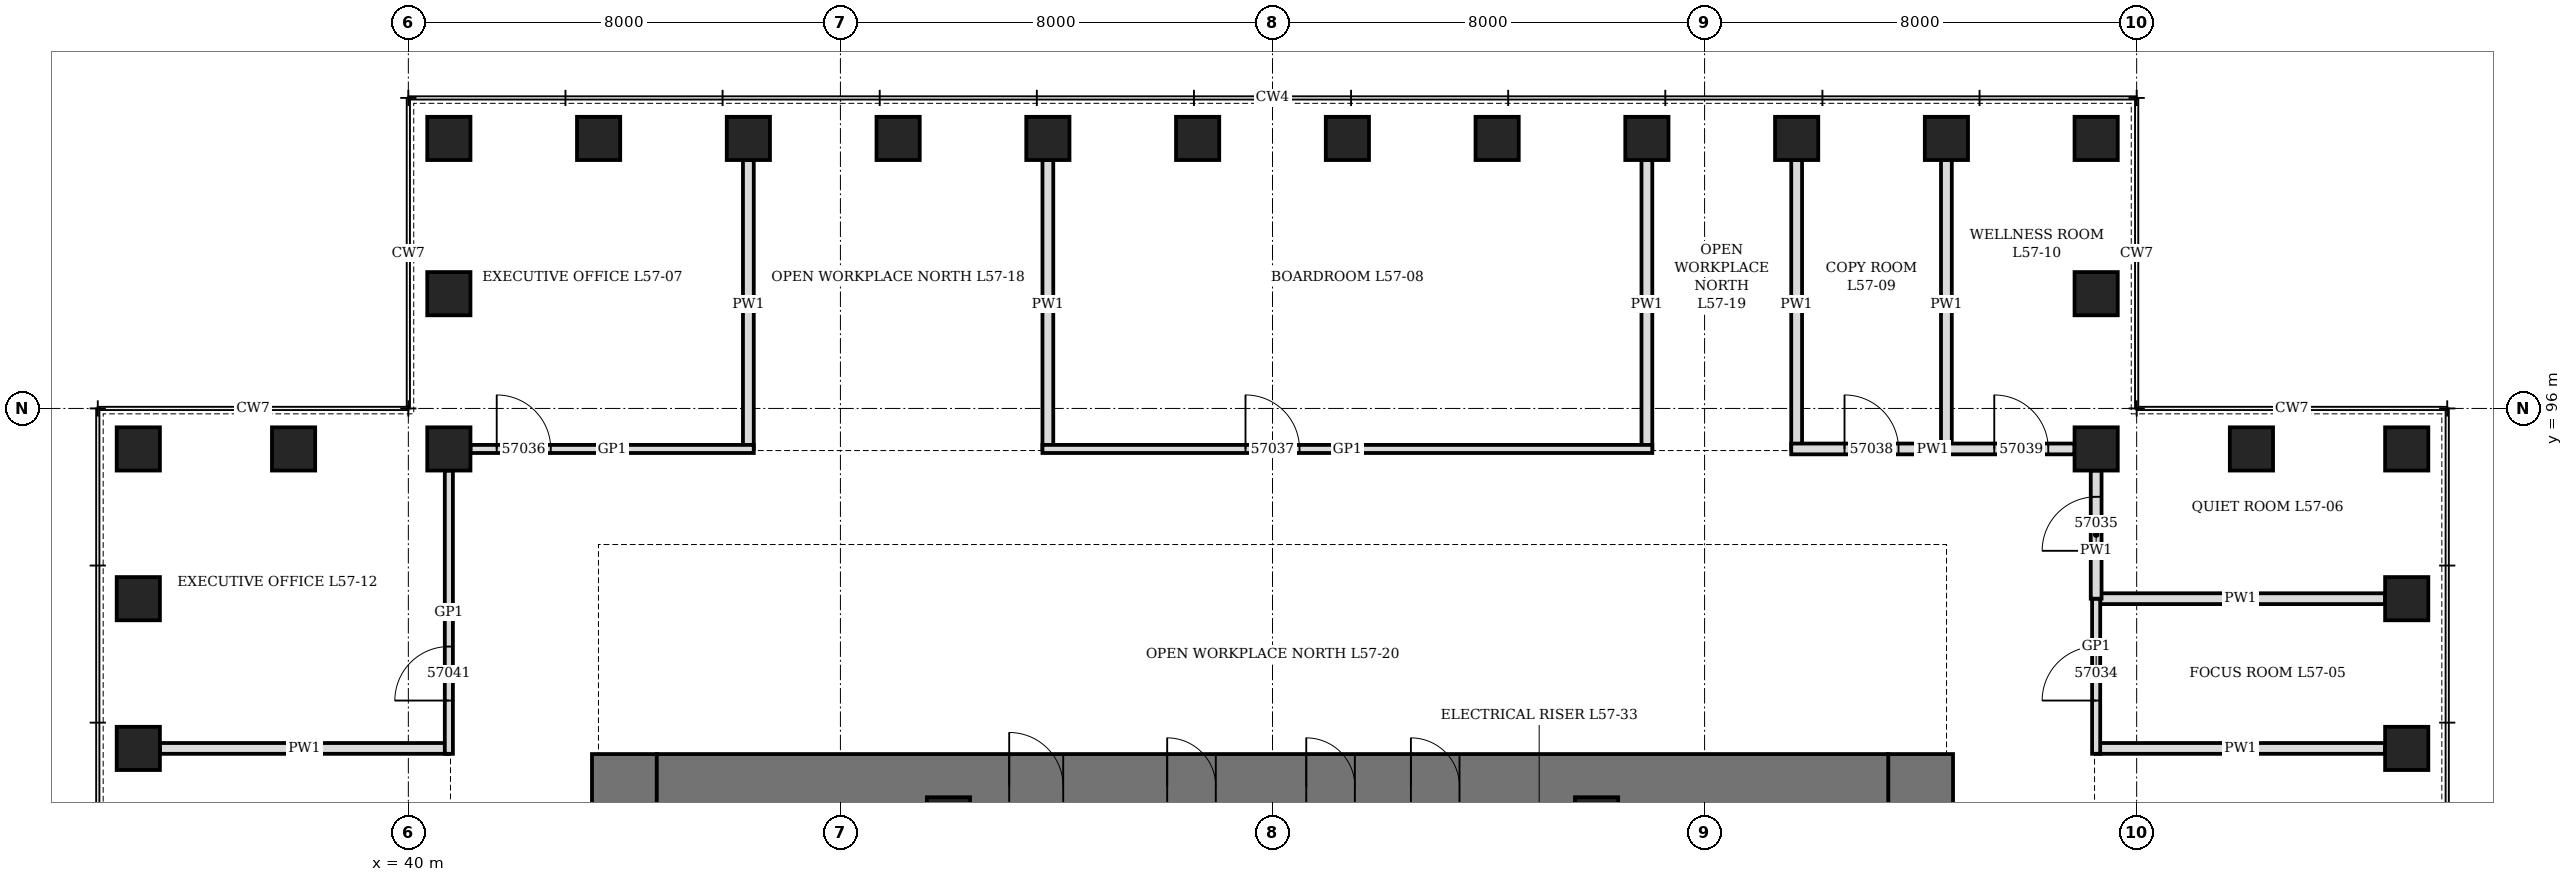
"""IFC4 building model, lengths in metres.
Left out: names, types, materials, properties, quantities, classifications, styles, units other than length and angle.
Written with IfcOpenShell. Run it as: python <this file> out.ifc"""

import sys

from ifc_helpers import new_model, si_unit, direction, frame, frame_2d, origin, origin_2d, place, context, subcontext, project, spatial, rectangle, hollow_rectangle, extrude, element, fill, save


model = new_model("IFC4")
c1 = context("Model", 3, precision=1e-05, world=origin(), true_north=direction((0.0, 1.0)))
c2 = subcontext(c1, "Body", "Model", "MODEL_VIEW")
j1 = project(units=[si_unit("LENGTHUNIT", "METRE"), si_unit("PLANEANGLEUNIT", "RADIAN")], contexts=[c1])
p1 = place(None, origin())
s1 = spatial("IfcSite", under=j1, at=p1, CompositionType="ELEMENT")
p2 = place(p1, origin())
s2 = spatial("IfcBuilding", under=s1, at=p2, CompositionType="ELEMENT")
p3 = place(p2, frame((0.0, 0.0, 254.5)))
s3 = spatial("IfcBuildingStorey", under=s2, at=p3, CompositionType="ELEMENT", Elevation=254.5)
for number, where, z_axis, x_axis in (
    (1, (77.0, 89.705, 0.0), (0.0, 0.0, 1.0), (0.0, 1.0, 0.0)),
    (2, (77.0, 92.477, 0.0), (0.0, 0.0, 1.0), (0.0, 1.0, 0.0)),
    (3, (77.0, 95.25, 0.0), (0.0, 0.0, 1.0), (1.0, 0.0, 0.0)),
    (4, (74.125, 95.25, 0.0), (0.0, 0.0, 1.0), (1.0, 0.0, 0.0)),
    (5, (71.25, 95.25, 0.0), (0.0, 0.0, 1.0), (0.0, 1.0, 0.0)),
    (6, (71.25, 98.125, 0.0), (0.0, 0.0, 1.0), (0.0, 1.0, 0.0)),
    (7, (71.25, 101.0, 0.0), (0.0, 0.0, 1.0), (1.0, 0.0, 0.0)),
    (8, (68.477, 101.0, 0.0), (0.0, 0.0, 1.0), (1.0, 0.0, 0.0)),
    (9, (65.705, 101.0, 0.0), (0.0, 0.0, 1.0), (1.0, 0.0, 0.0)),
    (10, (62.932, 101.0, 0.0), (0.0, 0.0, 1.0), (1.0, 0.0, 0.0)),
    (11, (60.159, 101.0, 0.0), (0.0, 0.0, 1.0), (1.0, 0.0, 0.0)),
    (12, (57.386, 101.0, 0.0), (0.0, 0.0, 1.0), (1.0, 0.0, 0.0)),
    (13, (54.614, 101.0, 0.0), (0.0, 0.0, 1.0), (1.0, 0.0, 0.0)),
    (14, (51.841, 101.0, 0.0), (0.0, 0.0, 1.0), (1.0, 0.0, 0.0)),
    (15, (49.068, 101.0, 0.0), (0.0, 0.0, 1.0), (1.0, 0.0, 0.0)),
    (16, (46.295, 101.0, 0.0), (0.0, 0.0, 1.0), (1.0, 0.0, 0.0)),
    (17, (43.523, 101.0, 0.0), (0.0, 0.0, 1.0), (1.0, 0.0, 0.0)),
    (18, (40.75, 101.0, 0.0), (0.0, 0.0, 1.0), (0.0, 1.0, 0.0)),
    (19, (40.75, 98.125, 0.0), (0.0, 0.0, 1.0), (0.0, 1.0, 0.0)),
    (20, (40.75, 95.25, 0.0), (0.0, 0.0, 1.0), (1.0, 0.0, 0.0)),
    (21, (37.875, 95.25, 0.0), (0.0, 0.0, 1.0), (1.0, 0.0, 0.0)),
    (22, (35.0, 95.25, 0.0), (0.0, 0.0, 1.0), (0.0, 1.0, 0.0)),
    (23, (35.0, 92.477, 0.0), (0.0, 0.0, 1.0), (0.0, 1.0, 0.0)),
    (24, (35.0, 89.705, 0.0), (0.0, 0.0, 1.0), (0.0, 1.0, 0.0)),
):
    element("IfcColumn", number, at=place(p3, frame(where, z_axis=z_axis, x_axis=x_axis)), inside=s3, PredefinedType="COLUMN", context=c2, shape_type="SweptSolid", body=[
        extrude(hollow_rectangle(XDim=0.8, YDim=0.8, WallThickness=0.1, at=origin_2d()), origin(), (0.0, 0.0, 1.0), 4.2),
    ])
p4 = place(p3, frame((44.0, 70.4, 0.0), z_axis=(0.0, 0.0, 1.0), x_axis=(0.0, 1.0, 0.0)))
e25 = element("IfcWall", 25, at=p4, inside=s3, PredefinedType="SHEAR", context=c2, shape_type="SweptSolid", body=[
    extrude(rectangle(XDim=19.2, YDim=1.2, at=frame_2d((9.6, 0.0))), origin(), (0.0, 0.0, 1.0), 4.2),
])
p5 = place(p4, frame((8.6, 0.0, 0.0)))
e26 = element("IfcOpeningElement", 26, at=p5, cuts=e25, PredefinedType="OPENING", context=c2, shape_type="SweptSolid", body=[
    extrude(rectangle(XDim=2.0, YDim=2.4, at=frame_2d((1.0, 1.2))), frame((0.0, 0.61, 0.0), z_axis=(0.0, -1.0, 0.0), x_axis=(1.0, 0.0, 0.0)), (0.0, 0.0, 1.0), 1.22),
])
p6 = place(p3, frame((68.0, 70.4, 0.0), z_axis=(0.0, 0.0, 1.0), x_axis=(0.0, 1.0, 0.0)))
e27 = element("IfcWall", 27, at=p6, inside=s3, PredefinedType="SHEAR", context=c2, shape_type="SweptSolid", body=[
    extrude(rectangle(XDim=19.2, YDim=1.2, at=frame_2d((9.6, 0.0))), origin(), (0.0, 0.0, 1.0), 4.2),
])
p7 = place(p6, frame((8.6, 0.0, 0.0)))
e28 = element("IfcOpeningElement", 28, at=p7, cuts=e27, PredefinedType="OPENING", context=c2, shape_type="SweptSolid", body=[
    extrude(rectangle(XDim=2.0, YDim=2.4, at=frame_2d((1.0, 1.2))), frame((0.0, 0.61, 0.0), z_axis=(0.0, -1.0, 0.0), x_axis=(1.0, 0.0, 0.0)), (0.0, 0.0, 1.0), 1.22),
])
p8 = place(p3, frame((44.6, 89.0, 0.0), z_axis=(0.0, 0.0, 1.0), x_axis=(1.0, 0.0, 0.0)))
e29 = element("IfcWall", 29, at=p8, inside=s3, PredefinedType="SHEAR", context=c2, shape_type="SweptSolid", body=[
    extrude(rectangle(XDim=22.8, YDim=1.2, at=frame_2d((11.4, 0.0))), origin(), (0.0, 0.0, 1.0), 4.2),
])
p9 = place(p8, frame((6.525, 0.0, 0.0)))
e30 = element("IfcOpeningElement", 30, at=p9, cuts=e29, PredefinedType="OPENING", context=c2, shape_type="SweptSolid", body=[
    extrude(rectangle(XDim=1.0, YDim=2.1, at=frame_2d((0.5, 1.05))), frame((0.0, 0.61, 0.0), z_axis=(0.0, -1.0, 0.0), x_axis=(1.0, 0.0, 0.0)), (0.0, 0.0, 1.0), 1.22),
])
p10 = place(p8, frame((9.45, 0.0, 0.0)))
e31 = element("IfcOpeningElement", 31, at=p10, cuts=e29, PredefinedType="OPENING", context=c2, shape_type="SweptSolid", body=[
    extrude(rectangle(XDim=0.9, YDim=2.1, at=frame_2d((0.45, 1.05))), frame((0.0, 0.61, 0.0), z_axis=(0.0, -1.0, 0.0), x_axis=(1.0, 0.0, 0.0)), (0.0, 0.0, 1.0), 1.22),
])
p11 = place(p8, frame((12.025, 0.0, 0.0)))
e32 = element("IfcOpeningElement", 32, at=p11, cuts=e29, PredefinedType="OPENING", context=c2, shape_type="SweptSolid", body=[
    extrude(rectangle(XDim=0.9, YDim=2.1, at=frame_2d((0.45, 1.05))), frame((0.0, 0.61, 0.0), z_axis=(0.0, -1.0, 0.0), x_axis=(1.0, 0.0, 0.0)), (0.0, 0.0, 1.0), 1.22),
])
p12 = place(p8, frame((13.962, 0.0, 0.0)))
e33 = element("IfcOpeningElement", 33, at=p12, cuts=e29, PredefinedType="OPENING", context=c2, shape_type="SweptSolid", body=[
    extrude(rectangle(XDim=0.9, YDim=2.1, at=frame_2d((0.45, 1.05))), frame((0.0, 0.61, 0.0), z_axis=(0.0, -1.0, 0.0), x_axis=(1.0, 0.0, 0.0)), (0.0, 0.0, 1.0), 1.22),
])
for number, where, z_axis, x_axis in (
    (34, (50.0, 88.4, 0.0), (0.0, 0.0, 1.0), (1.0, 0.0, 0.0)),
    (35, (62.0, 88.4, 0.0), (0.0, 0.0, 1.0), (1.0, 0.0, 0.0)),
):
    element("IfcColumn", number, at=place(p3, frame(where, z_axis=z_axis, x_axis=x_axis)), inside=s3, PredefinedType="COLUMN", context=c2, shape_type="SweptSolid", body=[
        extrude(hollow_rectangle(XDim=0.8, YDim=0.8, WallThickness=0.1, at=origin_2d()), origin(), (0.0, 0.0, 1.0), 4.2),
    ])
for number, where, z_axis, x_axis in (
    (36, (71.25, 89.705, 0.0), (0.0, 0.0, 1.0), (1.0, 0.0, 0.0)),
    (37, (71.25, 92.477, 0.0), (0.0, 0.0, 1.0), (1.0, 0.0, 0.0)),
    (38, (46.295, 95.25, 0.0), (0.0, 0.0, 1.0), (0.0, 1.0, 0.0)),
    (39, (51.841, 95.25, 0.0), (0.0, 0.0, 1.0), (0.0, 1.0, 0.0)),
    (40, (62.932, 95.25, 0.0), (0.0, 0.0, 1.0), (0.0, 1.0, 0.0)),
    (41, (65.705, 95.25, 0.0), (0.0, 0.0, 1.0), (0.0, 1.0, 0.0)),
    (42, (68.477, 95.25, 0.0), (0.0, 0.0, 1.0), (0.0, 1.0, 0.0)),
    (43, (35.4, 89.705, 0.0), (0.0, 0.0, 1.0), (1.0, 0.0, 0.0)),
):
    element("IfcWall", number, at=place(p3, frame(where, z_axis=z_axis, x_axis=x_axis)), inside=s3, PredefinedType="PARTITIONING", context=c2, shape_type="SweptSolid", body=[
        extrude(rectangle(XDim=5.35, YDim=0.2, at=frame_2d((2.675, 0.0))), origin(), (0.0, 0.0, 1.0), 3.428),
    ])
p13 = place(p3, frame((41.15, 95.25, 0.0), z_axis=(0.0, 0.0, 1.0), x_axis=(1.0, 0.0, 0.0)))
e44 = element("IfcWall", 44, at=p13, inside=s3, PredefinedType="PARTITIONING", context=c2, shape_type="SweptSolid", body=[
    extrude(rectangle(XDim=5.246, YDim=0.15, at=frame_2d((2.623, 0.0))), origin(), (0.0, 0.0, 1.0), 4.04),
])
p14 = place(p13, frame((0.486, 0.0, 0.0)))
e45 = element("IfcOpeningElement", 45, at=p14, cuts=e44, PredefinedType="OPENING", context=c2, shape_type="SweptSolid", body=[
    extrude(rectangle(XDim=1.0, YDim=2.1, at=frame_2d((0.5, 1.05))), frame((0.0, 0.085, 0.0), z_axis=(0.0, -1.0, 0.0), x_axis=(1.0, 0.0, 0.0)), (0.0, 0.0, 1.0), 0.17),
])
p15 = place(p3, frame((51.741, 95.25, 0.0), z_axis=(0.0, 0.0, 1.0), x_axis=(1.0, 0.0, 0.0)))
e46 = element("IfcWall", 46, at=p15, inside=s3, PredefinedType="PARTITIONING", context=c2, shape_type="SweptSolid", body=[
    extrude(rectangle(XDim=11.291, YDim=0.15, at=frame_2d((5.646, 0.0))), origin(), (0.0, 0.0, 1.0), 4.04),
])
p16 = place(p15, frame((3.759, 0.0, 0.0)))
e47 = element("IfcOpeningElement", 47, at=p16, cuts=e46, PredefinedType="OPENING", context=c2, shape_type="SweptSolid", body=[
    extrude(rectangle(XDim=1.0, YDim=2.4, at=frame_2d((0.5, 1.2))), frame((0.0, 0.085, 0.0), z_axis=(0.0, -1.0, 0.0), x_axis=(1.0, 0.0, 0.0)), (0.0, 0.0, 1.0), 0.17),
])
p17 = place(p3, frame((65.604, 95.25, 0.0), z_axis=(0.0, 0.0, 1.0), x_axis=(1.0, 0.0, 0.0)))
e48 = element("IfcWall", 48, at=p17, inside=s3, PredefinedType="PARTITIONING", context=c2, shape_type="SweptSolid", body=[
    extrude(rectangle(XDim=5.246, YDim=0.2, at=frame_2d((2.623, 0.0))), origin(), (0.0, 0.0, 1.0), 4.04),
])
p18 = place(p17, frame((0.986, 0.0, 0.0)))
e49 = element("IfcOpeningElement", 49, at=p18, cuts=e48, PredefinedType="OPENING", context=c2, shape_type="SweptSolid", body=[
    extrude(rectangle(XDim=1.0, YDim=2.1, at=frame_2d((0.5, 1.05))), frame((0.0, 0.11, 0.0), z_axis=(0.0, -1.0, 0.0), x_axis=(1.0, 0.0, 0.0)), (0.0, 0.0, 1.0), 0.22),
])
p19 = place(p17, frame((3.759, 0.0, 0.0)))
e50 = element("IfcOpeningElement", 50, at=p19, cuts=e48, PredefinedType="OPENING", context=c2, shape_type="SweptSolid", body=[
    extrude(rectangle(XDim=1.0, YDim=2.1, at=frame_2d((0.5, 1.05))), frame((0.0, 0.11, 0.0), z_axis=(0.0, -1.0, 0.0), x_axis=(1.0, 0.0, 0.0)), (0.0, 0.0, 1.0), 0.22),
])
p20 = place(p3, frame((40.75, 89.604, 0.0), z_axis=(0.0, 0.0, 1.0), x_axis=(0.0, 1.0, 0.0)))
e51 = element("IfcWall", 51, at=p20, inside=s3, PredefinedType="PARTITIONING", context=c2, shape_type="SweptSolid", body=[
    extrude(rectangle(XDim=5.246, YDim=0.15, at=frame_2d((2.623, 0.0))), origin(), (0.0, 0.0, 1.0), 4.04),
])
p21 = place(p20, frame((0.986, 0.0, 0.0)))
e52 = element("IfcOpeningElement", 52, at=p21, cuts=e51, PredefinedType="OPENING", context=c2, shape_type="SweptSolid", body=[
    extrude(rectangle(XDim=1.0, YDim=2.1, at=frame_2d((0.5, 1.05))), frame((0.0, 0.085, 0.0), z_axis=(0.0, -1.0, 0.0), x_axis=(1.0, 0.0, 0.0)), (0.0, 0.0, 1.0), 0.17),
])
p22 = place(p3, frame((71.25, 89.604, 0.0), z_axis=(0.0, 0.0, 1.0), x_axis=(0.0, 1.0, 0.0)))
e53 = element("IfcWall", 53, at=p22, inside=s3, PredefinedType="PARTITIONING", context=c2, shape_type="SweptSolid", body=[
    extrude(rectangle(XDim=2.873, YDim=0.15, at=frame_2d((1.437, 0.0))), origin(), (0.0, 0.0, 1.0), 4.04),
])
p23 = place(p22, frame((0.986, 0.0, 0.0)))
e54 = element("IfcOpeningElement", 54, at=p23, cuts=e53, PredefinedType="OPENING", context=c2, shape_type="SweptSolid", body=[
    extrude(rectangle(XDim=1.0, YDim=2.4, at=frame_2d((0.5, 1.2))), frame((0.0, 0.085, 0.0), z_axis=(0.0, -1.0, 0.0), x_axis=(1.0, 0.0, 0.0)), (0.0, 0.0, 1.0), 0.17),
])
p24 = place(p3, frame((71.25, 92.477, 0.0), z_axis=(0.0, 0.0, 1.0), x_axis=(0.0, 1.0, 0.0)))
e55 = element("IfcWall", 55, at=p24, inside=s3, PredefinedType="PARTITIONING", context=c2, shape_type="SweptSolid", body=[
    extrude(rectangle(XDim=2.373, YDim=0.2, at=frame_2d((1.187, 0.0))), origin(), (0.0, 0.0, 1.0), 4.04),
])
p25 = place(p24, frame((0.886, 0.0, 0.0)))
e56 = element("IfcOpeningElement", 56, at=p25, cuts=e55, PredefinedType="OPENING", context=c2, shape_type="SweptSolid", body=[
    extrude(rectangle(XDim=1.0, YDim=2.1, at=frame_2d((0.5, 1.05))), frame((0.0, 0.11, 0.0), z_axis=(0.0, -1.0, 0.0), x_axis=(1.0, 0.0, 0.0)), (0.0, 0.0, 1.0), 0.22),
])
p26 = place(p9, origin())
e57 = element("IfcDoor", 57, at=p26, inside=s3, OperationType="SINGLE_SWING_LEFT", PredefinedType="DOOR", context=c2, shape_type="SweptSolid", body=[
    extrude(rectangle(XDim=1.0, YDim=2.1, at=frame_2d((0.5, 1.05))), frame((0.0, 0.35, 0.0), z_axis=(0.0, -1.0, 0.0), x_axis=(1.0, 0.0, 0.0)), (0.0, 0.0, 1.0), 0.7),
])
fill(e30, e57)
p27 = place(p10, origin())
e58 = element("IfcDoor", 58, at=p27, inside=s3, OperationType="SINGLE_SWING_LEFT", PredefinedType="DOOR", context=c2, shape_type="SweptSolid", body=[
    extrude(rectangle(XDim=0.9, YDim=2.1, at=frame_2d((0.45, 1.05))), frame((0.0, 0.35, 0.0), z_axis=(0.0, -1.0, 0.0), x_axis=(1.0, 0.0, 0.0)), (0.0, 0.0, 1.0), 0.7),
])
fill(e31, e58)
p28 = place(p11, origin())
e59 = element("IfcDoor", 59, at=p28, inside=s3, OperationType="SINGLE_SWING_LEFT", PredefinedType="DOOR", context=c2, shape_type="SweptSolid", body=[
    extrude(rectangle(XDim=0.9, YDim=2.1, at=frame_2d((0.45, 1.05))), frame((0.0, 0.35, 0.0), z_axis=(0.0, -1.0, 0.0), x_axis=(1.0, 0.0, 0.0)), (0.0, 0.0, 1.0), 0.7),
])
fill(e32, e59)
p29 = place(p12, origin())
e60 = element("IfcDoor", 60, at=p29, inside=s3, OperationType="SINGLE_SWING_LEFT", PredefinedType="DOOR", context=c2, shape_type="SweptSolid", body=[
    extrude(rectangle(XDim=0.9, YDim=2.1, at=frame_2d((0.45, 1.05))), frame((0.0, 0.35, 0.0), z_axis=(0.0, -1.0, 0.0), x_axis=(1.0, 0.0, 0.0)), (0.0, 0.0, 1.0), 0.7),
])
fill(e33, e60)
p30 = place(p23, origin())
e61 = element("IfcDoor", 61, at=p30, inside=s3, OperationType="SINGLE_SWING_RIGHT", PredefinedType="DOOR", context=c2, shape_type="SweptSolid", body=[
    extrude(rectangle(XDim=1.0, YDim=2.4, at=frame_2d((0.5, 1.2))), frame((0.0, 0.075, 0.0), z_axis=(0.0, -1.0, 0.0), x_axis=(1.0, 0.0, 0.0)), (0.0, 0.0, 1.0), 0.149),
])
fill(e54, e61)
p31 = place(p25, origin())
e62 = element("IfcDoor", 62, at=p31, inside=s3, OperationType="SINGLE_SWING_LEFT", PredefinedType="DOOR", context=c2, shape_type="SweptSolid", body=[
    extrude(rectangle(XDim=1.0, YDim=2.1, at=frame_2d((0.5, 1.05))), frame((0.0, 0.1, 0.0), z_axis=(0.0, -1.0, 0.0), x_axis=(1.0, 0.0, 0.0)), (0.0, 0.0, 1.0), 0.199),
])
fill(e56, e62)
p32 = place(p14, origin())
e63 = element("IfcDoor", 63, at=p32, inside=s3, OperationType="SINGLE_SWING_LEFT", PredefinedType="DOOR", context=c2, shape_type="SweptSolid", body=[
    extrude(rectangle(XDim=1.0, YDim=2.1, at=frame_2d((0.5, 1.05))), frame((0.0, 0.075, 0.0), z_axis=(0.0, -1.0, 0.0), x_axis=(1.0, 0.0, 0.0)), (0.0, 0.0, 1.0), 0.149),
])
fill(e45, e63)
p33 = place(p16, origin())
e64 = element("IfcDoor", 64, at=p33, inside=s3, OperationType="SINGLE_SWING_RIGHT", PredefinedType="DOOR", context=c2, shape_type="SweptSolid", body=[
    extrude(rectangle(XDim=1.0, YDim=2.4, at=frame_2d((0.5, 1.2))), frame((0.0, 0.075, 0.0), z_axis=(0.0, -1.0, 0.0), x_axis=(1.0, 0.0, 0.0)), (0.0, 0.0, 1.0), 0.149),
])
fill(e47, e64)
p34 = place(p18, origin())
e65 = element("IfcDoor", 65, at=p34, inside=s3, OperationType="SINGLE_SWING_LEFT", PredefinedType="DOOR", context=c2, shape_type="SweptSolid", body=[
    extrude(rectangle(XDim=1.0, YDim=2.1, at=frame_2d((0.5, 1.05))), frame((0.0, 0.1, 0.0), z_axis=(0.0, -1.0, 0.0), x_axis=(1.0, 0.0, 0.0)), (0.0, 0.0, 1.0), 0.199),
])
fill(e49, e65)
p35 = place(p19, origin())
e66 = element("IfcDoor", 66, at=p35, inside=s3, OperationType="SINGLE_SWING_LEFT", PredefinedType="DOOR", context=c2, shape_type="SweptSolid", body=[
    extrude(rectangle(XDim=1.0, YDim=2.1, at=frame_2d((0.5, 1.05))), frame((0.0, 0.1, 0.0), z_axis=(0.0, -1.0, 0.0), x_axis=(1.0, 0.0, 0.0)), (0.0, 0.0, 1.0), 0.199),
])
fill(e50, e66)
p36 = place(p21, origin())
e67 = element("IfcDoor", 67, at=p36, inside=s3, OperationType="SINGLE_SWING_LEFT", PredefinedType="DOOR", context=c2, shape_type="SweptSolid", body=[
    extrude(rectangle(XDim=1.0, YDim=2.1, at=frame_2d((0.5, 1.05))), frame((0.0, 0.075, 0.0), z_axis=(0.0, -1.0, 0.0), x_axis=(1.0, 0.0, 0.0)), (0.0, 0.0, 1.0), 0.149),
])
fill(e52, e67)
save(model, sys.argv[1])
